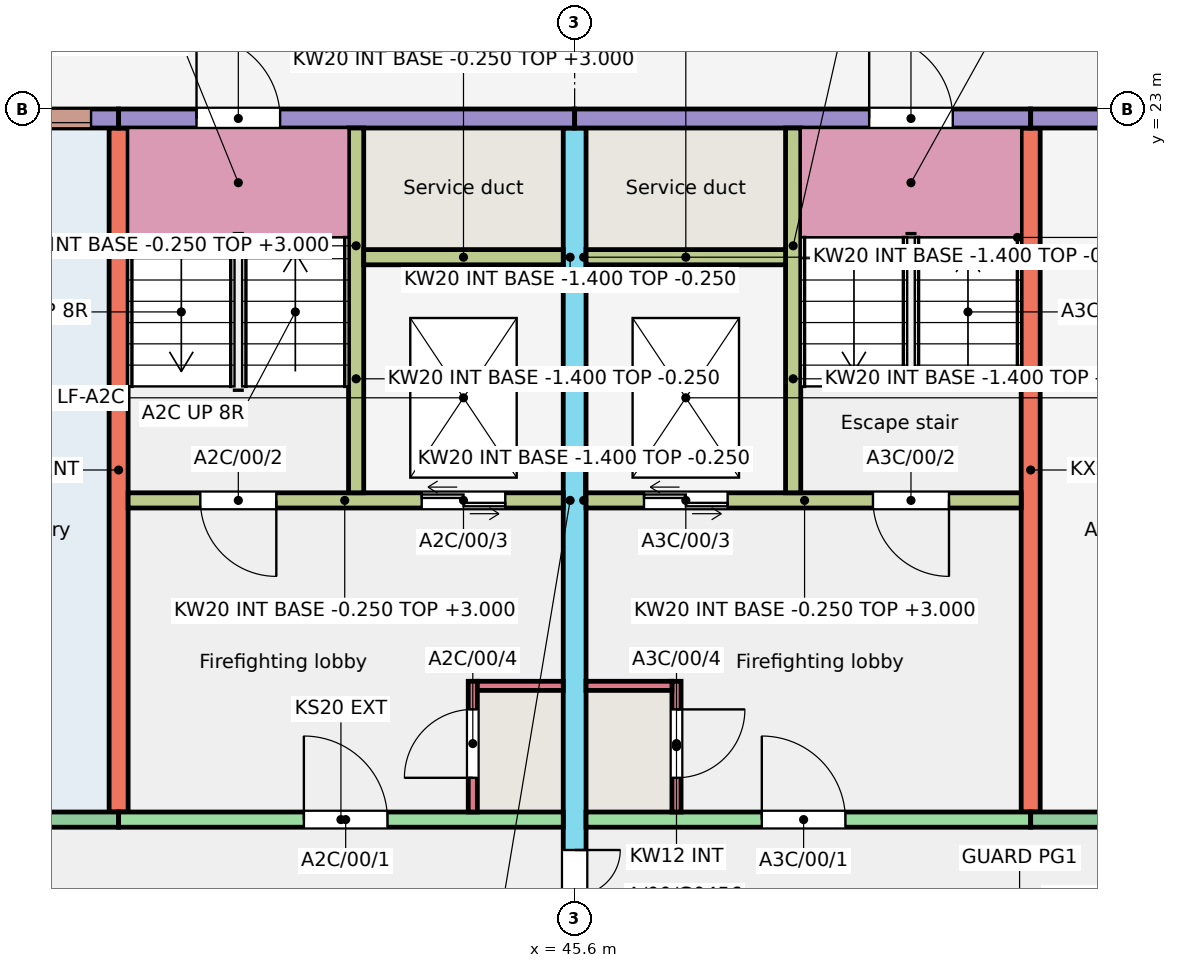
"""IFC4 building model, lengths in metres.
Left out: names, types, materials, properties, quantities, classifications, styles, units other than length and angle.
Written with IfcOpenShell. Run it as: python <this file> out.ifc"""

import sys

from ifc_helpers import new_model, si_unit, direction, frame, frame_2d, origin, place, context, subcontext, project, spatial, rectangle, extrude, element, fill, save


model = new_model("IFC4")
c1 = context("Model", 3, precision=1e-05, world=origin(), true_north=direction((0.0, 1.0)))
c2 = subcontext(c1, "Body", "Model", "MODEL_VIEW")
j1 = project(units=[si_unit("LENGTHUNIT", "METRE"), si_unit("PLANEANGLEUNIT", "RADIAN")], contexts=[c1])
p1 = place(None, origin())
s1 = spatial("IfcSite", under=j1, at=p1, CompositionType="ELEMENT")
p2 = place(p1, origin())
s2 = spatial("IfcBuilding", under=s1, at=p2, CompositionType="ELEMENT")
p3 = place(p2, origin())
s3 = spatial("IfcBuildingStorey", under=s2, at=p3, CompositionType="ELEMENT", Elevation=0.0)
p4 = place(p3, frame((39.6, 13.75, -0.25), z_axis=(0.0, 0.0, 1.0), x_axis=(0.0, 1.0, 0.0)))
e1 = element("IfcWall", 1, at=p4, inside=s3, PredefinedType="SHEAR", context=c2, shape_type="SweptSolid", body=[
    extrude(rectangle(XDim=9.0, YDim=0.25, at=frame_2d((4.5, 0.0))), origin(), (0.0, 0.0, 1.0), 3.25),
])
p5 = place(p3, frame((45.6, 11.75, -0.25), z_axis=(0.0, 0.0, 1.0), x_axis=(0.0, 1.0, 0.0)))
e2 = element("IfcWall", 2, at=p5, inside=s3, PredefinedType="SHEAR", context=c2, shape_type="SweptSolid", body=[
    extrude(rectangle(XDim=11.0, YDim=0.3, at=frame_2d((5.5, 0.0))), origin(), (0.0, 0.0, 1.0), 3.25),
])
p6 = place(p5, frame((0.3, 0.0, 0.25)))
e3 = element("IfcOpeningElement", 3, at=p6, cuts=e2, PredefinedType="OPENING", context=c2, shape_type="SweptSolid", body=[
    extrude(rectangle(XDim=1.2, YDim=2.1, at=frame_2d((0.6, 1.05))), frame((0.0, 0.16, 0.0), z_axis=(0.0, -1.0, 0.0), x_axis=(1.0, 0.0, 0.0)), (0.0, 0.0, 1.0), 0.32),
])
p7 = place(p3, frame((51.6, 13.75, -0.25), z_axis=(0.0, 0.0, 1.0), x_axis=(0.0, 1.0, 0.0)))
e4 = element("IfcWall", 4, at=p7, inside=s3, PredefinedType="SHEAR", context=c2, shape_type="SweptSolid", body=[
    extrude(rectangle(XDim=9.0, YDim=0.25, at=frame_2d((4.5, 0.0))), origin(), (0.0, 0.0, 1.0), 3.25),
])
p8 = place(p3, frame((36.0, 22.875, -0.25), z_axis=(0.0, 0.0, 1.0), x_axis=(1.0, 0.0, 0.0)))
e5 = element("IfcWall", 5, at=p8, inside=s3, PredefinedType="SOLIDWALL", context=c2, shape_type="SweptSolid", body=[
    extrude(rectangle(XDim=3.6, YDim=0.25, at=frame_2d((1.8, 0.0))), origin(), (0.0, 0.0, 1.0), 3.25),
])
p9 = place(p8, frame((2.637, 0.0, 2.05)))
e6 = element("IfcOpeningElement", 6, at=p9, cuts=e5, PredefinedType="OPENING", context=c2, shape_type="SweptSolid", body=[
    extrude(rectangle(XDim=0.6, YDim=0.6, at=frame_2d((0.3, 0.3))), frame((0.0, 0.135, 0.0), z_axis=(0.0, -1.0, 0.0), x_axis=(1.0, 0.0, 0.0)), (0.0, 0.0, 1.0), 0.27),
])
p10 = place(p8, frame((1.3, 0.0, 0.25)))
e7 = element("IfcOpeningElement", 7, at=p10, cuts=e5, PredefinedType="OPENING", context=c2, shape_type="SweptSolid", body=[
    extrude(rectangle(XDim=1.0, YDim=2.1, at=frame_2d((0.5, 1.05))), frame((0.0, 0.135, 0.0), z_axis=(0.0, -1.0, 0.0), x_axis=(1.0, 0.0, 0.0)), (0.0, 0.0, 1.0), 0.27),
])
p11 = place(p3, frame((36.0, 13.65, -0.25), z_axis=(0.0, 0.0, 1.0), x_axis=(1.0, 0.0, 0.0)))
e8 = element("IfcWall", 8, at=p11, inside=s3, PredefinedType="SOLIDWALL", context=c2, shape_type="SweptSolid", body=[
    extrude(rectangle(XDim=3.6, YDim=0.2, at=frame_2d((1.8, 0.0))), origin(), (0.0, 0.0, 1.0), 3.25),
])
p12 = place(p11, frame((1.3, 0.0, 0.25)))
e9 = element("IfcOpeningElement", 9, at=p12, cuts=e8, PredefinedType="OPENING", context=c2, shape_type="SweptSolid", body=[
    extrude(rectangle(XDim=1.0, YDim=2.1, at=frame_2d((0.5, 1.05))), frame((0.0, 0.11, 0.0), z_axis=(0.0, -1.0, 0.0), x_axis=(1.0, 0.0, 0.0)), (0.0, 0.0, 1.0), 0.22),
])
p13 = place(p3, frame((39.6, 22.875, -0.25), z_axis=(0.0, 0.0, 1.0), x_axis=(1.0, 0.0, 0.0)))
e10 = element("IfcWall", 10, at=p13, inside=s3, PredefinedType="SOLIDWALL", context=c2, shape_type="SweptSolid", body=[
    extrude(rectangle(XDim=6.0, YDim=0.25, at=frame_2d((3.0, 0.0))), origin(), (0.0, 0.0, 1.0), 3.25),
])
p14 = place(p13, frame((1.025, 0.0, 0.25)))
e11 = element("IfcOpeningElement", 11, at=p14, cuts=e10, PredefinedType="OPENING", context=c2, shape_type="SweptSolid", body=[
    extrude(rectangle(XDim=1.1, YDim=2.1, at=frame_2d((0.55, 1.05))), frame((0.0, 0.135, 0.0), z_axis=(0.0, -1.0, 0.0), x_axis=(1.0, 0.0, 0.0)), (0.0, 0.0, 1.0), 0.27),
])
p15 = place(p3, frame((39.6, 13.65, -0.25), z_axis=(0.0, 0.0, 1.0), x_axis=(1.0, 0.0, 0.0)))
e12 = element("IfcWall", 12, at=p15, inside=s3, PredefinedType="SHEAR", context=c2, shape_type="SweptSolid", body=[
    extrude(rectangle(XDim=5.85, YDim=0.2, at=frame_2d((2.925, 0.0))), origin(), (0.0, 0.0, 1.0), 3.25),
])
p16 = place(p15, frame((2.438, 0.0, 0.25)))
e13 = element("IfcOpeningElement", 13, at=p16, cuts=e12, PredefinedType="OPENING", context=c2, shape_type="SweptSolid", body=[
    extrude(rectangle(XDim=1.1, YDim=2.1, at=frame_2d((0.55, 1.05))), frame((0.0, 0.11, 0.0), z_axis=(0.0, -1.0, 0.0), x_axis=(1.0, 0.0, 0.0)), (0.0, 0.0, 1.0), 0.22),
])
p17 = place(p3, frame((39.725, 17.85, -0.25), z_axis=(0.0, 0.0, 1.0), x_axis=(1.0, 0.0, 0.0)))
e14 = element("IfcWall", 14, at=p17, inside=s3, PredefinedType="SHEAR", context=c2, shape_type="SweptSolid", body=[
    extrude(rectangle(XDim=5.725, YDim=0.2, at=frame_2d((2.862, 0.0))), origin(), (0.0, 0.0, 1.0), 3.25),
])
p18 = place(p17, frame((0.95, 0.0, 0.25)))
e15 = element("IfcOpeningElement", 15, at=p18, cuts=e14, PredefinedType="OPENING", context=c2, shape_type="SweptSolid", body=[
    extrude(rectangle(XDim=1.0, YDim=2.1, at=frame_2d((0.5, 1.05))), frame((0.0, 0.11, 0.0), z_axis=(0.0, -1.0, 0.0), x_axis=(1.0, 0.0, 0.0)), (0.0, 0.0, 1.0), 0.22),
])
p19 = place(p17, frame((3.863, 0.0, 0.25)))
e16 = element("IfcOpeningElement", 16, at=p19, cuts=e14, PredefinedType="OPENING", context=c2, shape_type="SweptSolid", body=[
    extrude(rectangle(XDim=1.1, YDim=2.1, at=frame_2d((0.55, 1.05))), frame((0.0, 0.11, 0.0), z_axis=(0.0, -1.0, 0.0), x_axis=(1.0, 0.0, 0.0)), (0.0, 0.0, 1.0), 0.22),
])
p20 = place(p3, frame((42.725, 17.95, -0.25), z_axis=(0.0, 0.0, 1.0), x_axis=(0.0, 1.0, 0.0)))
e17 = element("IfcWall", 17, at=p20, inside=s3, PredefinedType="SHEAR", context=c2, shape_type="SweptSolid", body=[
    extrude(rectangle(XDim=4.8, YDim=0.2, at=frame_2d((2.4, 0.0))), origin(), (0.0, 0.0, 1.0), 3.25),
])
p21 = place(p3, frame((42.825, 21.05, -0.25), z_axis=(0.0, 0.0, 1.0), x_axis=(1.0, 0.0, 0.0)))
e18 = element("IfcWall", 18, at=p21, inside=s3, PredefinedType="SHEAR", context=c2, shape_type="SweptSolid", body=[
    extrude(rectangle(XDim=2.625, YDim=0.2, at=frame_2d((1.312, 0.0))), origin(), (0.0, 0.0, 1.0), 3.25),
])
p22 = place(p3, frame((44.26, 13.75, -0.25), z_axis=(0.0, 0.0, 1.0), x_axis=(0.0, 1.0, 0.0)))
e19 = element("IfcWall", 19, at=p22, inside=s3, PredefinedType="SHEAR", context=c2, shape_type="SweptSolid", body=[
    extrude(rectangle(XDim=1.72, YDim=0.12, at=frame_2d((0.86, 0.0))), origin(), (0.0, 0.0, 1.0), 3.25),
])
p23 = place(p22, frame((0.45, 0.0, 0.25)))
e20 = element("IfcOpeningElement", 20, at=p23, cuts=e19, PredefinedType="OPENING", context=c2, shape_type="SweptSolid", body=[
    extrude(rectangle(XDim=0.9, YDim=2.1, at=frame_2d((0.45, 1.05))), frame((0.0, 0.07, 0.0), z_axis=(0.0, -1.0, 0.0), x_axis=(1.0, 0.0, 0.0)), (0.0, 0.0, 1.0), 0.14),
])
p24 = place(p3, frame((44.32, 15.41, -0.25), z_axis=(0.0, 0.0, 1.0), x_axis=(1.0, 0.0, 0.0)))
e21 = element("IfcWall", 21, at=p24, inside=s3, PredefinedType="SHEAR", context=c2, shape_type="SweptSolid", body=[
    extrude(rectangle(XDim=1.13, YDim=0.12, at=frame_2d((0.565, 0.0))), origin(), (0.0, 0.0, 1.0), 3.25),
])
p25 = place(p3, frame((45.6, 22.875, -0.25), z_axis=(0.0, 0.0, 1.0), x_axis=(1.0, 0.0, 0.0)))
e22 = element("IfcWall", 22, at=p25, inside=s3, PredefinedType="SOLIDWALL", context=c2, shape_type="SweptSolid", body=[
    extrude(rectangle(XDim=6.0, YDim=0.25, at=frame_2d((3.0, 0.0))), origin(), (0.0, 0.0, 1.0), 3.25),
])
p26 = place(p25, frame((3.875, 0.0, 0.25)))
e23 = element("IfcOpeningElement", 23, at=p26, cuts=e22, PredefinedType="OPENING", context=c2, shape_type="SweptSolid", body=[
    extrude(rectangle(XDim=1.1, YDim=2.1, at=frame_2d((0.55, 1.05))), frame((0.0, 0.135, 0.0), z_axis=(0.0, -1.0, 0.0), x_axis=(1.0, 0.0, 0.0)), (0.0, 0.0, 1.0), 0.27),
])
p27 = place(p3, frame((45.75, 13.65, -0.25), z_axis=(0.0, 0.0, 1.0), x_axis=(1.0, 0.0, 0.0)))
e24 = element("IfcWall", 24, at=p27, inside=s3, PredefinedType="SHEAR", context=c2, shape_type="SweptSolid", body=[
    extrude(rectangle(XDim=5.85, YDim=0.2, at=frame_2d((2.925, 0.0))), origin(), (0.0, 0.0, 1.0), 3.25),
])
p28 = place(p27, frame((2.312, 0.0, 0.25)))
e25 = element("IfcOpeningElement", 25, at=p28, cuts=e24, PredefinedType="OPENING", context=c2, shape_type="SweptSolid", body=[
    extrude(rectangle(XDim=1.1, YDim=2.1, at=frame_2d((0.55, 1.05))), frame((0.0, 0.11, 0.0), z_axis=(0.0, -1.0, 0.0), x_axis=(1.0, 0.0, 0.0)), (0.0, 0.0, 1.0), 0.22),
])
p29 = place(p3, frame((45.75, 17.85, -0.25), z_axis=(0.0, 0.0, 1.0), x_axis=(1.0, 0.0, 0.0)))
e26 = element("IfcWall", 26, at=p29, inside=s3, PredefinedType="SHEAR", context=c2, shape_type="SweptSolid", body=[
    extrude(rectangle(XDim=5.725, YDim=0.2, at=frame_2d((2.863, 0.0))), origin(), (0.0, 0.0, 1.0), 3.25),
])
p30 = place(p29, frame((3.775, 0.0, 0.25)))
e27 = element("IfcOpeningElement", 27, at=p30, cuts=e26, PredefinedType="OPENING", context=c2, shape_type="SweptSolid", body=[
    extrude(rectangle(XDim=1.0, YDim=2.1, at=frame_2d((0.5, 1.05))), frame((0.0, 0.11, 0.0), z_axis=(0.0, -1.0, 0.0), x_axis=(1.0, 0.0, 0.0)), (0.0, 0.0, 1.0), 0.22),
])
p31 = place(p29, frame((0.762, 0.0, 0.25)))
e28 = element("IfcOpeningElement", 28, at=p31, cuts=e26, PredefinedType="OPENING", context=c2, shape_type="SweptSolid", body=[
    extrude(rectangle(XDim=1.1, YDim=2.1, at=frame_2d((0.55, 1.05))), frame((0.0, 0.11, 0.0), z_axis=(0.0, -1.0, 0.0), x_axis=(1.0, 0.0, 0.0)), (0.0, 0.0, 1.0), 0.22),
])
p32 = place(p3, frame((48.475, 17.95, -0.25), z_axis=(0.0, 0.0, 1.0), x_axis=(0.0, 1.0, 0.0)))
e29 = element("IfcWall", 29, at=p32, inside=s3, PredefinedType="SHEAR", context=c2, shape_type="SweptSolid", body=[
    extrude(rectangle(XDim=4.8, YDim=0.2, at=frame_2d((2.4, 0.0))), origin(), (0.0, 0.0, 1.0), 3.25),
])
p33 = place(p3, frame((45.75, 21.05, -0.25), z_axis=(0.0, 0.0, 1.0), x_axis=(1.0, 0.0, 0.0)))
e30 = element("IfcWall", 30, at=p33, inside=s3, PredefinedType="SHEAR", context=c2, shape_type="SweptSolid", body=[
    extrude(rectangle(XDim=2.625, YDim=0.2, at=frame_2d((1.312, 0.0))), origin(), (0.0, 0.0, 1.0), 3.25),
])
p34 = place(p3, frame((46.94, 13.75, -0.25), z_axis=(0.0, 0.0, 1.0), x_axis=(0.0, 1.0, 0.0)))
e31 = element("IfcWall", 31, at=p34, inside=s3, PredefinedType="SHEAR", context=c2, shape_type="SweptSolid", body=[
    extrude(rectangle(XDim=1.72, YDim=0.12, at=frame_2d((0.86, 0.0))), origin(), (0.0, 0.0, 1.0), 3.25),
])
p35 = place(p34, frame((0.45, 0.0, 0.25)))
e32 = element("IfcOpeningElement", 32, at=p35, cuts=e31, PredefinedType="OPENING", context=c2, shape_type="SweptSolid", body=[
    extrude(rectangle(XDim=0.9, YDim=2.1, at=frame_2d((0.45, 1.05))), frame((0.0, 0.07, 0.0), z_axis=(0.0, -1.0, 0.0), x_axis=(1.0, 0.0, 0.0)), (0.0, 0.0, 1.0), 0.14),
])
p36 = place(p3, frame((45.75, 15.41, -0.25), z_axis=(0.0, 0.0, 1.0), x_axis=(1.0, 0.0, 0.0)))
e33 = element("IfcWall", 33, at=p36, inside=s3, PredefinedType="SHEAR", context=c2, shape_type="SweptSolid", body=[
    extrude(rectangle(XDim=1.13, YDim=0.12, at=frame_2d((0.565, 0.0))), origin(), (0.0, 0.0, 1.0), 3.25),
])
p37 = place(p3, frame((51.6, 22.875, -0.25), z_axis=(0.0, 0.0, 1.0), x_axis=(1.0, 0.0, 0.0)))
e34 = element("IfcWall", 34, at=p37, inside=s3, PredefinedType="SOLIDWALL", context=c2, shape_type="SweptSolid", body=[
    extrude(rectangle(XDim=3.6, YDim=0.25, at=frame_2d((1.8, 0.0))), origin(), (0.0, 0.0, 1.0), 3.25),
])
p38 = place(p37, frame((2.637, 0.0, 2.05)))
e35 = element("IfcOpeningElement", 35, at=p38, cuts=e34, PredefinedType="OPENING", context=c2, shape_type="SweptSolid", body=[
    extrude(rectangle(XDim=0.6, YDim=0.6, at=frame_2d((0.3, 0.3))), frame((0.0, 0.135, 0.0), z_axis=(0.0, -1.0, 0.0), x_axis=(1.0, 0.0, 0.0)), (0.0, 0.0, 1.0), 0.27),
])
p39 = place(p37, frame((1.3, 0.0, 0.25)))
e36 = element("IfcOpeningElement", 36, at=p39, cuts=e34, PredefinedType="OPENING", context=c2, shape_type="SweptSolid", body=[
    extrude(rectangle(XDim=1.0, YDim=2.1, at=frame_2d((0.5, 1.05))), frame((0.0, 0.135, 0.0), z_axis=(0.0, -1.0, 0.0), x_axis=(1.0, 0.0, 0.0)), (0.0, 0.0, 1.0), 0.27),
])
p40 = place(p3, frame((51.6, 13.65, -0.25), z_axis=(0.0, 0.0, 1.0), x_axis=(1.0, 0.0, 0.0)))
e37 = element("IfcWall", 37, at=p40, inside=s3, PredefinedType="SOLIDWALL", context=c2, shape_type="SweptSolid", body=[
    extrude(rectangle(XDim=3.6, YDim=0.2, at=frame_2d((1.8, 0.0))), origin(), (0.0, 0.0, 1.0), 3.25),
])
p41 = place(p40, frame((1.3, 0.0, 0.25)))
e38 = element("IfcOpeningElement", 38, at=p41, cuts=e37, PredefinedType="OPENING", context=c2, shape_type="SweptSolid", body=[
    extrude(rectangle(XDim=1.0, YDim=2.1, at=frame_2d((0.5, 1.05))), frame((0.0, 0.11, 0.0), z_axis=(0.0, -1.0, 0.0), x_axis=(1.0, 0.0, 0.0)), (0.0, 0.0, 1.0), 0.22),
])
for number, where, z_axis, x_axis in (
    (39, (42.625, 17.85, -1.4), (0.0, 0.0, 1.0), (1.0, 0.0, 0.0)),
    (40, (42.625, 21.05, -1.4), (0.0, 0.0, 1.0), (1.0, 0.0, 0.0)),
):
    element("IfcWall", number, at=place(p3, frame(where, z_axis=z_axis, x_axis=x_axis)), inside=s3, PredefinedType="SHEAR", context=c2, shape_type="SweptSolid", body=[
        extrude(rectangle(XDim=2.975, YDim=0.2, at=frame_2d((1.488, 0.0))), origin(), (0.0, 0.0, 1.0), 1.15),
    ])
p42 = place(p3, frame((42.725, 17.95, -1.4), z_axis=(0.0, 0.0, 1.0), x_axis=(0.0, 1.0, 0.0)))
e41 = element("IfcWall", 41, at=p42, inside=s3, PredefinedType="SHEAR", context=c2, shape_type="SweptSolid", body=[
    extrude(rectangle(XDim=3.0, YDim=0.2, at=frame_2d((1.5, 0.0))), origin(), (0.0, 0.0, 1.0), 1.15),
])
p43 = place(p3, frame((45.525, 17.95, -1.4), z_axis=(0.0, 0.0, 1.0), x_axis=(0.0, 1.0, 0.0)))
e42 = element("IfcWall", 42, at=p43, inside=s3, PredefinedType="SHEAR", context=c2, shape_type="SweptSolid", body=[
    extrude(rectangle(XDim=3.0, YDim=0.15, at=frame_2d((1.5, 0.0))), origin(), (0.0, 0.0, 1.0), 1.15),
])
for number, where, z_axis, x_axis in (
    (43, (45.6, 17.85, -1.4), (0.0, 0.0, 1.0), (1.0, 0.0, 0.0)),
    (44, (45.6, 21.05, -1.4), (0.0, 0.0, 1.0), (1.0, 0.0, 0.0)),
):
    element("IfcWall", number, at=place(p3, frame(where, z_axis=z_axis, x_axis=x_axis)), inside=s3, PredefinedType="SHEAR", context=c2, shape_type="SweptSolid", body=[
        extrude(rectangle(XDim=2.975, YDim=0.2, at=frame_2d((1.487, 0.0))), origin(), (0.0, 0.0, 1.0), 1.15),
    ])
p44 = place(p3, frame((48.475, 17.95, -1.4), z_axis=(0.0, 0.0, 1.0), x_axis=(0.0, 1.0, 0.0)))
e45 = element("IfcWall", 45, at=p44, inside=s3, PredefinedType="SHEAR", context=c2, shape_type="SweptSolid", body=[
    extrude(rectangle(XDim=3.0, YDim=0.2, at=frame_2d((1.5, 0.0))), origin(), (0.0, 0.0, 1.0), 1.15),
])
p45 = place(p3, frame((45.675, 17.95, -1.4), z_axis=(0.0, 0.0, 1.0), x_axis=(0.0, 1.0, 0.0)))
e46 = element("IfcWall", 46, at=p45, inside=s3, PredefinedType="SHEAR", context=c2, shape_type="SweptSolid", body=[
    extrude(rectangle(XDim=3.0, YDim=0.15, at=frame_2d((1.5, 0.0))), origin(), (0.0, 0.0, 1.0), 1.15),
])
p46 = place(p9, origin())
e47 = element("IfcWindow", 47, at=p46, inside=s3, PartitioningType="SINGLE_PANEL", PredefinedType="WINDOW", context=c2, shape_type="SweptSolid", body=[
    extrude(rectangle(XDim=0.6, YDim=0.6, at=frame_2d((0.3, 0.3))), frame((0.0, -0.025, 0.0), z_axis=(0.0, -1.0, 0.0), x_axis=(1.0, 0.0, 0.0)), (0.0, 0.0, 1.0), 0.06),
])
fill(e6, e47)
p47 = place(p16, origin())
e48 = element("IfcDoor", 48, at=p47, inside=s3, OperationType="SINGLE_SWING_LEFT", PredefinedType="DOOR", context=c2, shape_type="SweptSolid", body=[
    extrude(rectangle(XDim=1.1, YDim=2.1, at=frame_2d((0.55, 1.05))), frame((0.0, 0.025, 0.0), z_axis=(0.0, -1.0, 0.0), x_axis=(1.0, 0.0, 0.0)), (0.0, 0.0, 1.0), 0.05),
])
fill(e13, e48)
p48 = place(p18, origin())
e49 = element("IfcDoor", 49, at=p48, inside=s3, OperationType="SINGLE_SWING_RIGHT", PredefinedType="DOOR", context=c2, shape_type="SweptSolid", body=[
    extrude(rectangle(XDim=1.0, YDim=2.1, at=frame_2d((0.5, 1.05))), frame((0.0, 0.025, 0.0), z_axis=(0.0, -1.0, 0.0), x_axis=(1.0, 0.0, 0.0)), (0.0, 0.0, 1.0), 0.05),
])
fill(e15, e49)
p49 = place(p19, origin())
e50 = element("IfcDoor", 50, at=p49, inside=s3, OperationType="DOUBLE_DOOR_SLIDING", PredefinedType="DOOR", context=c2, shape_type="SweptSolid", body=[
    extrude(rectangle(XDim=1.1, YDim=2.1, at=frame_2d((0.55, 1.05))), frame((0.0, 0.025, 0.0), z_axis=(0.0, -1.0, 0.0), x_axis=(1.0, 0.0, 0.0)), (0.0, 0.0, 1.0), 0.05),
])
fill(e16, e50)
p50 = place(p23, origin())
e51 = element("IfcDoor", 51, at=p50, inside=s3, OperationType="SINGLE_SWING_LEFT", PredefinedType="DOOR", context=c2, shape_type="SweptSolid", body=[
    extrude(rectangle(XDim=0.9, YDim=2.1, at=frame_2d((0.45, 1.05))), frame((0.0, 0.025, 0.0), z_axis=(0.0, -1.0, 0.0), x_axis=(1.0, 0.0, 0.0)), (0.0, 0.0, 1.0), 0.05),
])
fill(e20, e51)
p51 = place(p14, origin())
e52 = element("IfcDoor", 52, at=p51, inside=s3, OperationType="SINGLE_SWING_LEFT", PredefinedType="DOOR", context=c2, shape_type="SweptSolid", body=[
    extrude(rectangle(XDim=1.1, YDim=2.1, at=frame_2d((0.55, 1.05))), frame((0.0, 0.025, 0.0), z_axis=(0.0, -1.0, 0.0), x_axis=(1.0, 0.0, 0.0)), (0.0, 0.0, 1.0), 0.05),
])
fill(e11, e52)
p52 = place(p28, origin())
e53 = element("IfcDoor", 53, at=p52, inside=s3, OperationType="SINGLE_SWING_LEFT", PredefinedType="DOOR", context=c2, shape_type="SweptSolid", body=[
    extrude(rectangle(XDim=1.1, YDim=2.1, at=frame_2d((0.55, 1.05))), frame((0.0, 0.025, 0.0), z_axis=(0.0, -1.0, 0.0), x_axis=(1.0, 0.0, 0.0)), (0.0, 0.0, 1.0), 0.05),
])
fill(e25, e53)
p53 = place(p30, origin())
e54 = element("IfcDoor", 54, at=p53, inside=s3, OperationType="SINGLE_SWING_RIGHT", PredefinedType="DOOR", context=c2, shape_type="SweptSolid", body=[
    extrude(rectangle(XDim=1.0, YDim=2.1, at=frame_2d((0.5, 1.05))), frame((0.0, 0.025, 0.0), z_axis=(0.0, -1.0, 0.0), x_axis=(1.0, 0.0, 0.0)), (0.0, 0.0, 1.0), 0.05),
])
fill(e27, e54)
p54 = place(p31, origin())
e55 = element("IfcDoor", 55, at=p54, inside=s3, OperationType="DOUBLE_DOOR_SLIDING", PredefinedType="DOOR", context=c2, shape_type="SweptSolid", body=[
    extrude(rectangle(XDim=1.1, YDim=2.1, at=frame_2d((0.55, 1.05))), frame((0.0, 0.025, 0.0), z_axis=(0.0, -1.0, 0.0), x_axis=(1.0, 0.0, 0.0)), (0.0, 0.0, 1.0), 0.05),
])
fill(e28, e55)
p55 = place(p35, origin())
e56 = element("IfcDoor", 56, at=p55, inside=s3, OperationType="SINGLE_SWING_RIGHT", PredefinedType="DOOR", context=c2, shape_type="SweptSolid", body=[
    extrude(rectangle(XDim=0.9, YDim=2.1, at=frame_2d((0.45, 1.05))), frame((0.0, 0.025, 0.0), z_axis=(0.0, -1.0, 0.0), x_axis=(1.0, 0.0, 0.0)), (0.0, 0.0, 1.0), 0.05),
])
fill(e32, e56)
p56 = place(p26, origin())
e57 = element("IfcDoor", 57, at=p56, inside=s3, OperationType="SINGLE_SWING_LEFT", PredefinedType="DOOR", context=c2, shape_type="SweptSolid", body=[
    extrude(rectangle(XDim=1.1, YDim=2.1, at=frame_2d((0.55, 1.05))), frame((0.0, 0.025, 0.0), z_axis=(0.0, -1.0, 0.0), x_axis=(1.0, 0.0, 0.0)), (0.0, 0.0, 1.0), 0.05),
])
fill(e23, e57)
p57 = place(p6, origin())
e58 = element("IfcDoor", 58, at=p57, inside=s3, OperationType="DOUBLE_DOOR_SINGLE_SWING", PredefinedType="DOOR", context=c2, shape_type="SweptSolid", body=[
    extrude(rectangle(XDim=1.2, YDim=2.1, at=frame_2d((0.6, 1.05))), frame((0.0, 0.025, 0.0), z_axis=(0.0, -1.0, 0.0), x_axis=(1.0, 0.0, 0.0)), (0.0, 0.0, 1.0), 0.05),
])
fill(e3, e58)
save(model, sys.argv[1])
